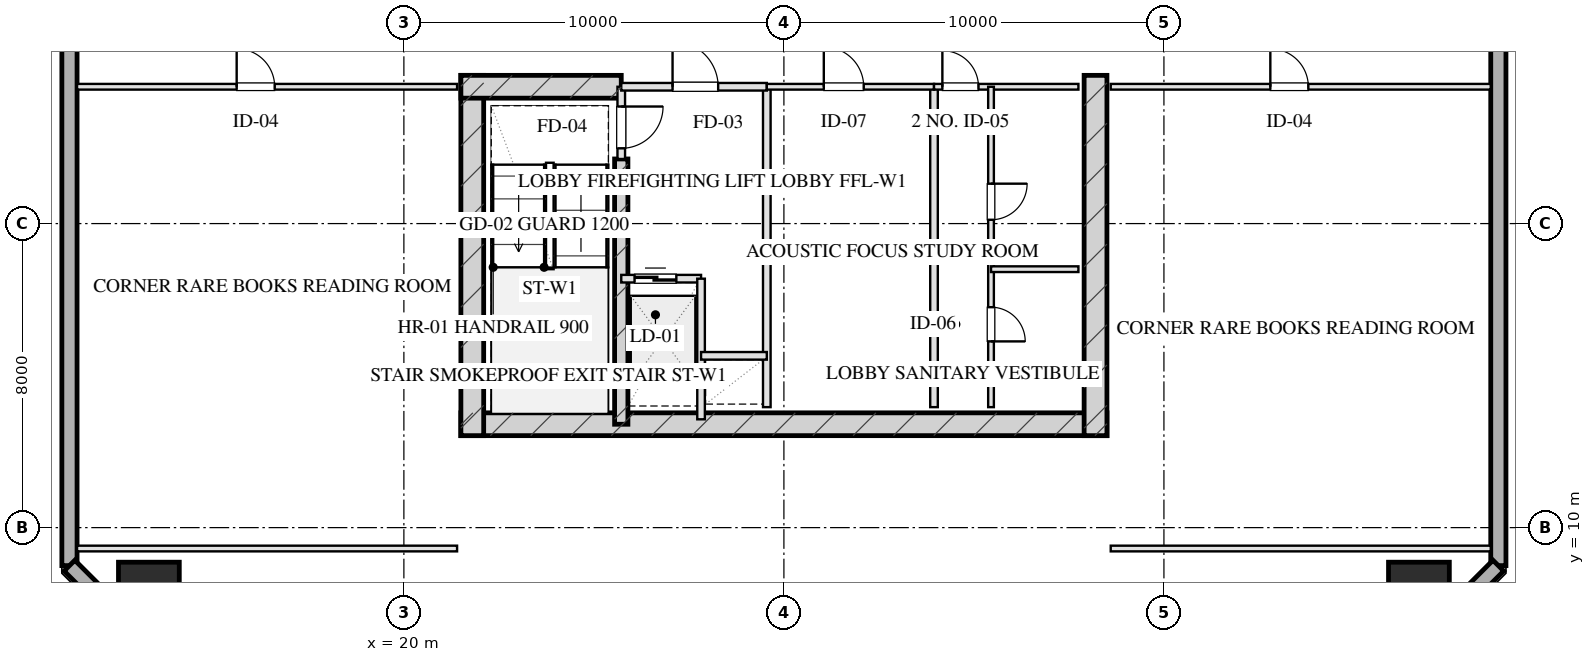
"""IFC4 building model, lengths in metres.
Left out: names, types, materials, properties, quantities, classifications, styles, units other than length and angle.
Written with IfcOpenShell. Run it as: python <this file> out.ifc"""

import sys

from ifc_helpers import new_model, si_unit, direction, frame, frame_2d, origin, origin_2d, place, context, subcontext, project, spatial, rectangle, hollow_rectangle, extrude, element, fill, save


model = new_model("IFC4")
c1 = context("Model", 3, precision=1e-05, world=origin(), true_north=direction((0.0, 1.0)))
c2 = subcontext(c1, "Body", "Model", "MODEL_VIEW")
j1 = project(units=[si_unit("LENGTHUNIT", "METRE"), si_unit("PLANEANGLEUNIT", "RADIAN")], contexts=[c1])
p1 = place(None, origin())
s1 = spatial("IfcSite", under=j1, at=p1, CompositionType="ELEMENT")
p2 = place(p1, origin())
s2 = spatial("IfcBuilding", under=s1, at=p2, CompositionType="ELEMENT")
p3 = place(p2, frame((0.0, 0.0, 103.5)))
s3 = spatial("IfcBuildingStorey", under=s2, at=p3, CompositionType="ELEMENT", Elevation=103.5)
p4 = place(p3, frame((21.5, 12.72, 0.0), z_axis=(0.0, 0.0, 1.0), x_axis=(1.0, 0.0, 0.0)))
e1 = element("IfcWall", 1, at=p4, inside=s3, PredefinedType="SHEAR", context=c2, shape_type="SweptSolid", body=[
    extrude(rectangle(XDim=17.0, YDim=0.6, at=frame_2d((8.5, 0.0))), origin(), (0.0, 0.0, 1.0), 3.45),
])
for number, where, z_axis, x_axis in (
    (2, (21.8, 21.9, 0.0), (0.0, 0.0, 1.0), (0.0, -1.0, 0.0)),
    (3, (38.2, 21.9, 0.0), (0.0, 0.0, 1.0), (0.0, -1.0, 0.0)),
):
    element("IfcWall", number, at=place(p3, frame(where, z_axis=z_axis, x_axis=x_axis)), inside=s3, PredefinedType="SHEAR", context=c2, shape_type="SweptSolid", body=[
        extrude(rectangle(XDim=9.48, YDim=0.6, at=frame_2d((4.74, 0.0))), origin(), (0.0, 0.0, 1.0), 3.45),
    ])
p5 = place(p3, frame((25.72, 19.7, 0.0), z_axis=(0.0, 0.0, 1.0), x_axis=(0.0, -1.0, 0.0)))
e4 = element("IfcWall", 4, at=p5, inside=s3, PredefinedType="SHEAR", context=c2, shape_type="SweptSolid", body=[
    extrude(rectangle(XDim=6.98, YDim=0.35, at=frame_2d((3.49, 0.0))), origin(), (0.0, 0.0, 1.0), 3.45),
])
p6 = place(p3, frame((21.5, 21.6, 0.0), z_axis=(0.0, 0.0, 1.0), x_axis=(1.0, 0.0, 0.0)))
e5 = element("IfcWall", 5, at=p6, inside=s3, PredefinedType="SHEAR", context=c2, shape_type="SweptSolid", body=[
    extrude(rectangle(XDim=4.22, YDim=0.6, at=frame_2d((2.11, 0.0))), origin(), (0.0, 0.0, 1.0), 3.45),
])
for number, where, z_axis, x_axis in (
    (6, (13.29, 8.29, 0.0), (0.0, 0.0, 1.0), (1.0, 0.0, 0.0)),
    (7, (46.71, 8.29, 0.0), (0.0, 0.0, 1.0), (1.0, 0.0, 0.0)),
):
    element("IfcColumn", number, at=place(p3, frame(where, z_axis=z_axis, x_axis=x_axis)), inside=s3, PredefinedType="COLUMN", context=c2, shape_type="SweptSolid", body=[
        extrude(hollow_rectangle(XDim=1.6, YDim=1.6, WallThickness=0.055, at=origin_2d()), origin(), (0.0, 0.0, 1.0), 3.451),
    ])
p7 = place(p3, frame((11.2, 9.0, 0.0), z_axis=(0.0, 0.0, 1.0), x_axis=(0.0, 1.0, 0.0)))
e8 = element("IfcWall", 8, at=p7, inside=s3, PredefinedType="SOLIDWALL", context=c2, shape_type="SweptSolid", body=[
    extrude(rectangle(XDim=50.0, YDim=0.4, at=frame_2d((25.0, 0.0))), origin(), (0.0, 0.0, 1.0), 2.61),
])
p8 = place(p7, frame((26.4, 0.0, 0.75)))
e9 = element("IfcOpeningElement", 9, at=p8, cuts=e8, PredefinedType="OPENING", context=c2, shape_type="SweptSolid", body=[
    extrude(rectangle(XDim=2.4, YDim=1.46, at=frame_2d((1.2, 0.73))), frame((0.0, 0.21, 0.0), z_axis=(0.0, -1.0, 0.0), x_axis=(1.0, 0.0, 0.0)), (0.0, 0.0, 1.0), 0.42),
])
p9 = place(p7, frame((21.35, 0.0, 0.0)))
e10 = element("IfcOpeningElement", 10, at=p9, cuts=e8, PredefinedType="OPENING", context=c2, shape_type="SweptSolid", body=[
    extrude(rectangle(XDim=1.1, YDim=2.15, at=frame_2d((0.55, 1.075))), frame((0.0, 0.21, 0.0), z_axis=(0.0, -1.0, 0.0), x_axis=(1.0, 0.0, 0.0)), (0.0, 0.0, 1.0), 0.42),
])
p10 = place(p3, frame((48.8, 59.0, 0.0), z_axis=(0.0, 0.0, 1.0), x_axis=(0.0, -1.0, 0.0)))
e11 = element("IfcWall", 11, at=p10, inside=s3, PredefinedType="SOLIDWALL", context=c2, shape_type="SweptSolid", body=[
    extrude(rectangle(XDim=50.0, YDim=0.4, at=frame_2d((25.0, 0.0))), origin(), (0.0, 0.0, 1.0), 2.61),
])
p11 = place(p10, frame((27.55, 0.0, 0.0)))
e12 = element("IfcOpeningElement", 12, at=p11, cuts=e11, PredefinedType="OPENING", context=c2, shape_type="SweptSolid", body=[
    extrude(rectangle(XDim=1.1, YDim=2.15, at=frame_2d((0.55, 1.075))), frame((0.0, 0.21, 0.0), z_axis=(0.0, -1.0, 0.0), x_axis=(1.0, 0.0, 0.0)), (0.0, 0.0, 1.0), 0.42),
])
for number, where, z_axis, x_axis in (
    (13, (48.8, 9.0, 0.0), (0.0, 0.0, 1.0), (-0.707, -0.707, 0.0)),
    (14, (14.0, 6.2, 0.0), (0.0, 0.0, 1.0), (-0.707, 0.707, 0.0)),
):
    element("IfcWall", number, at=place(p3, frame(where, z_axis=z_axis, x_axis=x_axis)), inside=s3, PredefinedType="SOLIDWALL", context=c2, shape_type="SweptSolid", body=[
        extrude(rectangle(XDim=3.96, YDim=0.4, at=frame_2d((1.98, 0.0))), origin(), (0.0, 0.0, 1.0), 2.61),
    ])
p12 = place(p3, frame((25.72, 21.6, 0.0), z_axis=(0.0, 0.0, 1.0), x_axis=(0.0, -1.0, 0.0)))
e15 = element("IfcWall", 15, at=p12, inside=s3, PredefinedType="PARTITIONING", context=c2, shape_type="SweptSolid", body=[
    extrude(rectangle(XDim=1.9, YDim=0.2, at=frame_2d((0.95, 0.0))), origin(), (0.0, 0.0, 1.0), 3.175),
])
p13 = place(p12, frame((0.52, 0.0, 0.0)))
e16 = element("IfcOpeningElement", 16, at=p13, cuts=e15, PredefinedType="OPENING", context=c2, shape_type="SweptSolid", body=[
    extrude(rectangle(XDim=1.1, YDim=2.05, at=frame_2d((0.55, 1.025))), frame((0.0, 0.11, 0.0), z_axis=(0.0, -1.0, 0.0), x_axis=(1.0, 0.0, 0.0)), (0.0, 0.0, 1.0), 0.22),
])
p14 = place(p3, frame((29.55, 21.6, 0.0), z_axis=(0.0, 0.0, 1.0), x_axis=(0.0, -1.0, 0.0)))
e17 = element("IfcWall", 17, at=p14, inside=s3, PredefinedType="PARTITIONING", context=c2, shape_type="SweptSolid", body=[
    extrude(rectangle(XDim=8.43, YDim=0.2, at=frame_2d((4.215, 0.0))), origin(), (0.0, 0.0, 1.0), 3.175),
])
p15 = place(p3, frame((25.72, 21.6, 0.0), z_axis=(0.0, 0.0, 1.0), x_axis=(1.0, 0.0, 0.0)))
e18 = element("IfcWall", 18, at=p15, inside=s3, PredefinedType="PARTITIONING", context=c2, shape_type="SweptSolid", body=[
    extrude(rectangle(XDim=3.83, YDim=0.2, at=frame_2d((1.915, 0.0))), origin(), (0.0, 0.0, 1.0), 3.175),
])
p16 = place(p15, frame((1.35, 0.0, 0.0)))
e19 = element("IfcOpeningElement", 19, at=p16, cuts=e18, PredefinedType="OPENING", context=c2, shape_type="SweptSolid", body=[
    extrude(rectangle(XDim=1.2, YDim=2.05, at=frame_2d((0.6, 1.025))), frame((0.0, 0.11, 0.0), z_axis=(0.0, -1.0, 0.0), x_axis=(1.0, 0.0, 0.0)), (0.0, 0.0, 1.0), 0.22),
])
p17 = place(p3, frame((25.72, 16.55, 0.0), z_axis=(0.0, 0.0, 1.0), x_axis=(1.0, 0.0, 0.0)))
e20 = element("IfcWall", 20, at=p17, inside=s3, PredefinedType="PARTITIONING", context=c2, shape_type="SweptSolid", body=[
    extrude(rectangle(XDim=2.1, YDim=0.2, at=frame_2d((1.05, 0.0))), origin(), (0.0, 0.0, 1.0), 3.175),
])
p18 = place(p17, frame((0.35, 0.0, 0.0)))
e21 = element("IfcOpeningElement", 21, at=p18, cuts=e20, PredefinedType="OPENING", context=c2, shape_type="SweptSolid", body=[
    extrude(rectangle(XDim=1.1, YDim=2.05, at=frame_2d((0.55, 1.025))), frame((0.0, 0.11, 0.0), z_axis=(0.0, -1.0, 0.0), x_axis=(1.0, 0.0, 0.0)), (0.0, 0.0, 1.0), 0.22),
])
p19 = place(p3, frame((27.82, 16.55, 0.0), z_axis=(0.0, 0.0, 1.0), x_axis=(0.0, -1.0, 0.0)))
e22 = element("IfcWall", 22, at=p19, inside=s3, PredefinedType="PARTITIONING", context=c2, shape_type="SweptSolid", body=[
    extrude(rectangle(XDim=3.7, YDim=0.2, at=frame_2d((1.85, 0.0))), origin(), (0.0, 0.0, 1.0), 3.175),
])
p20 = place(p3, frame((27.82, 14.52, 0.0), z_axis=(0.0, 0.0, 1.0), x_axis=(1.0, 0.0, 0.0)))
e23 = element("IfcWall", 23, at=p20, inside=s3, PredefinedType="PARTITIONING", context=c2, shape_type="SweptSolid", body=[
    extrude(rectangle(XDim=1.73, YDim=0.2, at=frame_2d((0.865, 0.0))), origin(), (0.0, 0.0, 1.0), 3.175),
])
p21 = place(p3, frame((33.95, 21.6, 0.0), z_axis=(0.0, 0.0, 1.0), x_axis=(0.0, -1.0, 0.0)))
e24 = element("IfcWall", 24, at=p21, inside=s3, PredefinedType="PARTITIONING", context=c2, shape_type="SweptSolid", body=[
    extrude(rectangle(XDim=8.43, YDim=0.2, at=frame_2d((4.215, 0.0))), origin(), (0.0, 0.0, 1.0), 3.175),
])
p22 = place(p3, frame((29.55, 21.6, 0.0), z_axis=(0.0, 0.0, 1.0), x_axis=(1.0, 0.0, 0.0)))
e25 = element("IfcWall", 25, at=p22, inside=s3, PredefinedType="PARTITIONING", context=c2, shape_type="SweptSolid", body=[
    extrude(rectangle(XDim=4.4, YDim=0.15, at=frame_2d((2.2, 0.0))), origin(), (0.0, 0.0, 1.0), 3.175),
])
p23 = place(p22, frame((1.5, 0.0, 0.0)))
e26 = element("IfcOpeningElement", 26, at=p23, cuts=e25, PredefinedType="OPENING", context=c2, shape_type="SweptSolid", body=[
    extrude(rectangle(XDim=1.05, YDim=2.05, at=frame_2d((0.525, 1.025))), frame((0.0, 0.085, 0.0), z_axis=(0.0, -1.0, 0.0), x_axis=(1.0, 0.0, 0.0)), (0.0, 0.0, 1.0), 0.17),
])
p24 = place(p3, frame((29.55, 17.3, 0.0), z_axis=(0.0, 0.0, 1.0), x_axis=(1.0, 0.0, 0.0)))
e27 = element("IfcWall", 27, at=p24, inside=s3, PredefinedType="PARTITIONING", context=c2, shape_type="SweptSolid", body=[
    extrude(rectangle(XDim=4.4, YDim=0.15, at=frame_2d((2.2, 0.0))), origin(), (0.0, 0.0, 1.0), 3.175),
])
p25 = place(p3, frame((33.95, 21.6, 0.0), z_axis=(0.0, 0.0, 1.0), x_axis=(1.0, 0.0, 0.0)))
e28 = element("IfcWall", 28, at=p25, inside=s3, PredefinedType="PARTITIONING", context=c2, shape_type="SweptSolid", body=[
    extrude(rectangle(XDim=3.8, YDim=0.15, at=frame_2d((1.9, 0.0))), origin(), (0.0, 0.0, 1.0), 3.175),
])
p26 = place(p25, frame((0.22, 0.0, 0.0)))
e29 = element("IfcOpeningElement", 29, at=p26, cuts=e28, PredefinedType="OPENING", context=c2, shape_type="SweptSolid", body=[
    extrude(rectangle(XDim=0.95, YDim=2.05, at=frame_2d((0.475, 1.025))), frame((0.0, 0.085, 0.0), z_axis=(0.0, -1.0, 0.0), x_axis=(1.0, 0.0, 0.0)), (0.0, 0.0, 1.0), 0.17),
])
p27 = place(p3, frame((35.45, 21.6, 0.0), z_axis=(0.0, 0.0, 1.0), x_axis=(0.0, -1.0, 0.0)))
e30 = element("IfcWall", 30, at=p27, inside=s3, PredefinedType="PARTITIONING", context=c2, shape_type="SweptSolid", body=[
    extrude(rectangle(XDim=8.43, YDim=0.15, at=frame_2d((4.215, 0.0))), origin(), (0.0, 0.0, 1.0), 2.765),
])
p28 = place(p27, frame((2.55, 0.0, 0.0)))
e31 = element("IfcOpeningElement", 31, at=p28, cuts=e30, PredefinedType="OPENING", context=c2, shape_type="SweptSolid", body=[
    extrude(rectangle(XDim=0.95, YDim=2.05, at=frame_2d((0.475, 1.025))), frame((0.0, 0.085, 0.0), z_axis=(0.0, -1.0, 0.0), x_axis=(1.0, 0.0, 0.0)), (0.0, 0.0, 1.0), 0.17),
])
p29 = place(p27, frame((5.8, 0.0, 0.0)))
e32 = element("IfcOpeningElement", 32, at=p29, cuts=e30, PredefinedType="OPENING", context=c2, shape_type="SweptSolid", body=[
    extrude(rectangle(XDim=0.9, YDim=2.05, at=frame_2d((0.45, 1.025))), frame((0.0, 0.085, 0.0), z_axis=(0.0, -1.0, 0.0), x_axis=(1.0, 0.0, 0.0)), (0.0, 0.0, 1.0), 0.17),
])
p30 = place(p3, frame((35.45, 16.8, 0.0), z_axis=(0.0, 0.0, 1.0), x_axis=(1.0, 0.0, 0.0)))
e33 = element("IfcWall", 33, at=p30, inside=s3, PredefinedType="PARTITIONING", context=c2, shape_type="SweptSolid", body=[
    extrude(rectangle(XDim=2.3, YDim=0.15, at=frame_2d((1.15, 0.0))), origin(), (0.0, 0.0, 1.0), 3.175),
])
p31 = place(p3, frame((11.4, 9.45, 0.0), z_axis=(0.0, 0.0, 1.0), x_axis=(1.0, 0.0, 0.0)))
e34 = element("IfcWall", 34, at=p31, inside=s3, PredefinedType="PARTITIONING", context=c2, shape_type="SweptSolid", body=[
    extrude(rectangle(XDim=10.0, YDim=0.15, at=frame_2d((5.0, 0.0))), origin(), (0.0, 0.0, 1.0), 3.175),
])
p32 = place(p3, frame((11.4, 21.6, 0.0), z_axis=(0.0, 0.0, 1.0), x_axis=(1.0, 0.0, 0.0)))
e35 = element("IfcWall", 35, at=p32, inside=s3, PredefinedType="PARTITIONING", context=c2, shape_type="SweptSolid", body=[
    extrude(rectangle(XDim=10.0, YDim=0.15, at=frame_2d((5.0, 0.0))), origin(), (0.0, 0.0, 1.0), 3.175),
])
p33 = place(p32, frame((4.2, 0.0, 0.0)))
e36 = element("IfcOpeningElement", 36, at=p33, cuts=e35, PredefinedType="OPENING", context=c2, shape_type="SweptSolid", body=[
    extrude(rectangle(XDim=1.0, YDim=2.05, at=frame_2d((0.5, 1.025))), frame((0.0, 0.085, 0.0), z_axis=(0.0, -1.0, 0.0), x_axis=(1.0, 0.0, 0.0)), (0.0, 0.0, 1.0), 0.17),
])
p34 = place(p3, frame((38.6, 9.45, 0.0), z_axis=(0.0, 0.0, 1.0), x_axis=(1.0, 0.0, 0.0)))
e37 = element("IfcWall", 37, at=p34, inside=s3, PredefinedType="PARTITIONING", context=c2, shape_type="SweptSolid", body=[
    extrude(rectangle(XDim=10.0, YDim=0.15, at=frame_2d((5.0, 0.0))), origin(), (0.0, 0.0, 1.0), 3.175),
])
p35 = place(p3, frame((38.6, 21.6, 0.0), z_axis=(0.0, 0.0, 1.0), x_axis=(1.0, 0.0, 0.0)))
e38 = element("IfcWall", 38, at=p35, inside=s3, PredefinedType="PARTITIONING", context=c2, shape_type="SweptSolid", body=[
    extrude(rectangle(XDim=10.0, YDim=0.15, at=frame_2d((5.0, 0.0))), origin(), (0.0, 0.0, 1.0), 3.175),
])
p36 = place(p35, frame((4.2, 0.0, 0.0)))
e39 = element("IfcOpeningElement", 39, at=p36, cuts=e38, PredefinedType="OPENING", context=c2, shape_type="SweptSolid", body=[
    extrude(rectangle(XDim=1.0, YDim=2.05, at=frame_2d((0.5, 1.025))), frame((0.0, 0.085, 0.0), z_axis=(0.0, -1.0, 0.0), x_axis=(1.0, 0.0, 0.0)), (0.0, 0.0, 1.0), 0.17),
])
p37 = place(p13, origin())
e40 = element("IfcDoor", 40, at=p37, inside=s3, OperationType="SINGLE_SWING_LEFT", PredefinedType="DOOR", context=c2, shape_type="SweptSolid", body=[
    extrude(rectangle(XDim=1.1, YDim=2.05, at=frame_2d((0.55, 1.025))), frame((0.0, 0.025, 0.0), z_axis=(0.0, -1.0, 0.0), x_axis=(1.0, 0.0, 0.0)), (0.0, 0.0, 1.0), 0.05),
])
fill(e16, e40)
p38 = place(p16, origin())
e41 = element("IfcDoor", 41, at=p38, inside=s3, OperationType="SINGLE_SWING_LEFT", PredefinedType="DOOR", context=c2, shape_type="SweptSolid", body=[
    extrude(rectangle(XDim=1.2, YDim=2.05, at=frame_2d((0.6, 1.025))), frame((0.0, 0.025, 0.0), z_axis=(0.0, -1.0, 0.0), x_axis=(1.0, 0.0, 0.0)), (0.0, 0.0, 1.0), 0.05),
])
fill(e19, e41)
p39 = place(p18, origin())
e42 = element("IfcDoor", 42, at=p39, inside=s3, OperationType="DOUBLE_DOOR_SLIDING", PredefinedType="DOOR", context=c2, shape_type="SweptSolid", body=[
    extrude(rectangle(XDim=1.1, YDim=2.05, at=frame_2d((0.55, 1.025))), frame((0.0, 0.025, 0.0), z_axis=(0.0, -1.0, 0.0), x_axis=(1.0, 0.0, 0.0)), (0.0, 0.0, 1.0), 0.05),
])
fill(e21, e42)
p40 = place(p23, origin())
e43 = element("IfcDoor", 43, at=p40, inside=s3, OperationType="SINGLE_SWING_LEFT", PredefinedType="DOOR", context=c2, shape_type="SweptSolid", body=[
    extrude(rectangle(XDim=1.05, YDim=2.05, at=frame_2d((0.525, 1.025))), frame((0.0, 0.025, 0.0), z_axis=(0.0, -1.0, 0.0), x_axis=(1.0, 0.0, 0.0)), (0.0, 0.0, 1.0), 0.05),
])
fill(e26, e43)
p41 = place(p26, origin())
e44 = element("IfcDoor", 44, at=p41, inside=s3, OperationType="SINGLE_SWING_LEFT", PredefinedType="DOOR", context=c2, shape_type="SweptSolid", body=[
    extrude(rectangle(XDim=0.95, YDim=2.05, at=frame_2d((0.475, 1.025))), frame((0.0, 0.025, 0.0), z_axis=(0.0, -1.0, 0.0), x_axis=(1.0, 0.0, 0.0)), (0.0, 0.0, 1.0), 0.05),
])
fill(e29, e44)
p42 = place(p28, origin())
e45 = element("IfcDoor", 45, at=p42, inside=s3, OperationType="SINGLE_SWING_LEFT", PredefinedType="DOOR", context=c2, shape_type="SweptSolid", body=[
    extrude(rectangle(XDim=0.95, YDim=2.05, at=frame_2d((0.475, 1.025))), frame((0.0, 0.025, 0.0), z_axis=(0.0, -1.0, 0.0), x_axis=(1.0, 0.0, 0.0)), (0.0, 0.0, 1.0), 0.05),
])
fill(e31, e45)
p43 = place(p29, origin())
e46 = element("IfcDoor", 46, at=p43, inside=s3, OperationType="SINGLE_SWING_RIGHT", PredefinedType="DOOR", context=c2, shape_type="SweptSolid", body=[
    extrude(rectangle(XDim=0.9, YDim=2.05, at=frame_2d((0.45, 1.025))), frame((0.0, 0.025, 0.0), z_axis=(0.0, -1.0, 0.0), x_axis=(1.0, 0.0, 0.0)), (0.0, 0.0, 1.0), 0.05),
])
fill(e32, e46)
p44 = place(p33, origin())
e47 = element("IfcDoor", 47, at=p44, inside=s3, OperationType="SINGLE_SWING_LEFT", PredefinedType="DOOR", context=c2, shape_type="SweptSolid", body=[
    extrude(rectangle(XDim=1.0, YDim=2.05, at=frame_2d((0.5, 1.025))), frame((0.0, 0.025, 0.0), z_axis=(0.0, -1.0, 0.0), x_axis=(1.0, 0.0, 0.0)), (0.0, 0.0, 1.0), 0.05),
])
fill(e36, e47)
p45 = place(p36, origin())
e48 = element("IfcDoor", 48, at=p45, inside=s3, OperationType="SINGLE_SWING_LEFT", PredefinedType="DOOR", context=c2, shape_type="SweptSolid", body=[
    extrude(rectangle(XDim=1.0, YDim=2.05, at=frame_2d((0.5, 1.025))), frame((0.0, 0.025, 0.0), z_axis=(0.0, -1.0, 0.0), x_axis=(1.0, 0.0, 0.0)), (0.0, 0.0, 1.0), 0.05),
])
fill(e39, e48)
save(model, sys.argv[1])
